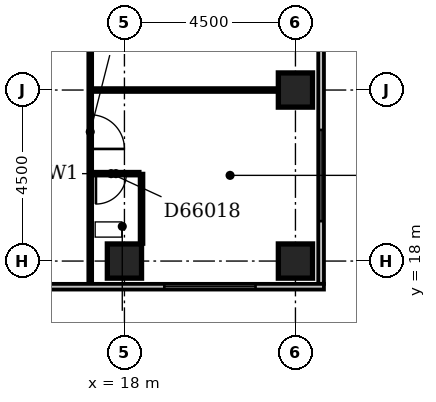
"""IFC4 building model, lengths in metres.
Left out: names, types, materials, properties, quantities, classifications, styles, units other than length and angle.
Written with IfcOpenShell. Run it as: python <this file> out.ifc"""

import sys

from ifc_helpers import new_model, si_unit, direction, frame, frame_2d, origin, origin_2d, place, context, subcontext, project, spatial, rectangle, extrude, element, fill, save


model = new_model("IFC4")
c1 = context("Model", 3, precision=1e-05, world=origin(), true_north=direction((0.0, 1.0)))
c2 = subcontext(c1, "Body", "Model", "MODEL_VIEW")
j1 = project(units=[si_unit("LENGTHUNIT", "METRE"), si_unit("PLANEANGLEUNIT", "RADIAN")], contexts=[c1])
p1 = place(None, origin())
s1 = spatial("IfcSite", under=j1, at=p1, CompositionType="ELEMENT")
p2 = place(p1, origin())
s2 = spatial("IfcBuilding", under=s1, at=p2, CompositionType="ELEMENT")
p3 = place(p2, frame((0.0, 0.0, 254.6)))
s3 = spatial("IfcBuildingStorey", under=s2, at=p3, CompositionType="ELEMENT", Elevation=254.6)
for number, where, z_axis, x_axis in (
    (1, (18.0, 18.0, -0.3), (0.0, 0.0, 1.0), (1.0, 0.0, 0.0)),
    (2, (22.5, 18.0, -0.3), (0.0, 0.0, 1.0), (1.0, 0.0, 0.0)),
    (3, (22.5, 22.5, -0.3), (0.0, 0.0, 1.0), (1.0, 0.0, 0.0)),
):
    element("IfcColumn", number, at=place(p3, frame(where, z_axis=z_axis, x_axis=x_axis)), inside=s3, PredefinedType="COLUMN", context=c2, shape_type="SweptSolid", body=[
        extrude(rectangle(XDim=0.9, YDim=0.9, at=origin_2d()), origin(), (0.0, 0.0, 1.0), 3.45),
    ])
p4 = place(p3, frame((3.9, 17.325, 0.0), z_axis=(0.0, 0.0, 1.0), x_axis=(1.0, 0.0, 0.0)))
e4 = element("IfcWall", 4, at=p4, inside=s3, PredefinedType="STANDARD", context=c2, shape_type="SweptSolid", body=[
    extrude(rectangle(XDim=19.35, YDim=0.15, at=frame_2d((9.675, 0.0))), origin(), (0.0, 0.0, 1.0), 2.7),
])
p5 = place(p4, frame((6.15, 0.0, 0.6)))
e5 = element("IfcOpeningElement", 5, at=p5, cuts=e4, PredefinedType="OPENING", context=c2, shape_type="SweptSolid", body=[
    extrude(rectangle(XDim=2.4, YDim=1.8, at=frame_2d((1.2, 0.9))), frame((0.0, 0.087, 0.0), z_axis=(0.0, -1.0, 0.0), x_axis=(1.0, 0.0, 0.0)), (0.0, 0.0, 1.0), 0.174),
])
p6 = place(p4, frame((15.15, 0.0, 0.6)))
e6 = element("IfcOpeningElement", 6, at=p6, cuts=e4, PredefinedType="OPENING", context=c2, shape_type="SweptSolid", body=[
    extrude(rectangle(XDim=2.4, YDim=1.8, at=frame_2d((1.2, 0.9))), frame((0.0, 0.087, 0.0), z_axis=(0.0, -1.0, 0.0), x_axis=(1.0, 0.0, 0.0)), (0.0, 0.0, 1.0), 0.174),
])
p7 = place(p3, frame((23.175, 17.4, 0.0), z_axis=(0.0, 0.0, 1.0), x_axis=(0.0, 1.0, 0.0)))
e7 = element("IfcWall", 7, at=p7, inside=s3, PredefinedType="STANDARD", context=c2, shape_type="SweptSolid", body=[
    extrude(rectangle(XDim=17.85, YDim=0.15, at=frame_2d((8.925, 0.0))), origin(), (0.0, 0.0, 1.0), 2.7),
])
p8 = place(p7, frame((1.65, 0.0, 0.6)))
e8 = element("IfcOpeningElement", 8, at=p8, cuts=e7, PredefinedType="OPENING", context=c2, shape_type="SweptSolid", body=[
    extrude(rectangle(XDim=2.4, YDim=1.8, at=frame_2d((1.2, 0.9))), frame((0.0, 0.087, 0.0), z_axis=(0.0, -1.0, 0.0), x_axis=(1.0, 0.0, 0.0)), (0.0, 0.0, 1.0), 0.174),
])
p9 = place(p7, frame((6.15, 0.0, 0.6)))
e9 = element("IfcOpeningElement", 9, at=p9, cuts=e7, PredefinedType="OPENING", context=c2, shape_type="SweptSolid", body=[
    extrude(rectangle(XDim=2.4, YDim=1.8, at=frame_2d((1.2, 0.9))), frame((0.0, 0.087, 0.0), z_axis=(0.0, -1.0, 0.0), x_axis=(1.0, 0.0, 0.0)), (0.0, 0.0, 1.0), 0.174),
])
p10 = place(p7, frame((10.65, 0.0, 0.6)))
e10 = element("IfcOpeningElement", 10, at=p10, cuts=e7, PredefinedType="OPENING", context=c2, shape_type="SweptSolid", body=[
    extrude(rectangle(XDim=2.4, YDim=1.8, at=frame_2d((1.2, 0.9))), frame((0.0, 0.087, 0.0), z_axis=(0.0, -1.0, 0.0), x_axis=(1.0, 0.0, 0.0)), (0.0, 0.0, 1.0), 0.174),
])
p11 = place(p7, frame((14.817, 0.0, 0.6)))
e11 = element("IfcOpeningElement", 11, at=p11, cuts=e7, PredefinedType="OPENING", context=c2, shape_type="SweptSolid", body=[
    extrude(rectangle(XDim=0.9, YDim=1.8, at=frame_2d((0.45, 0.9))), frame((0.0, 0.087, 0.0), z_axis=(0.0, -1.0, 0.0), x_axis=(1.0, 0.0, 0.0)), (0.0, 0.0, 1.0), 0.174),
])
p12 = place(p3, frame((17.1, 17.4, 0.0), z_axis=(0.0, 0.0, 1.0), x_axis=(0.0, 1.0, 0.0)))
e12 = element("IfcWall", 12, at=p12, inside=s3, PredefinedType="PARTITIONING", context=c2, shape_type="SweptSolid", body=[
    extrude(rectangle(XDim=18.5, YDim=0.1, at=frame_2d((9.25, 0.0))), origin(), (0.0, 0.0, 1.0), 3.15),
])
p13 = place(p12, frame((3.55, 0.0, 0.0)))
e13 = element("IfcOpeningElement", 13, at=p13, cuts=e12, PredefinedType="OPENING", context=c2, shape_type="SweptSolid", body=[
    extrude(rectangle(XDim=0.9, YDim=2.1, at=frame_2d((0.45, 1.05))), frame((0.0, 0.062, 0.0), z_axis=(0.0, -1.0, 0.0), x_axis=(1.0, 0.0, 0.0)), (0.0, 0.0, 1.0), 0.124),
])
p14 = place(p12, frame((9.1, 0.0, 0.0)))
e14 = element("IfcOpeningElement", 14, at=p14, cuts=e12, PredefinedType="OPENING", context=c2, shape_type="SweptSolid", body=[
    extrude(rectangle(XDim=0.9, YDim=2.1, at=frame_2d((0.45, 1.05))), frame((0.0, 0.062, 0.0), z_axis=(0.0, -1.0, 0.0), x_axis=(1.0, 0.0, 0.0)), (0.0, 0.0, 1.0), 0.124),
])
p15 = place(p12, frame((14.75, 0.0, 0.0)))
e15 = element("IfcOpeningElement", 15, at=p15, cuts=e12, PredefinedType="OPENING", context=c2, shape_type="SweptSolid", body=[
    extrude(rectangle(XDim=0.9, YDim=2.1, at=frame_2d((0.45, 1.05))), frame((0.0, 0.062, 0.0), z_axis=(0.0, -1.0, 0.0), x_axis=(1.0, 0.0, 0.0)), (0.0, 0.0, 1.0), 0.124),
])
p16 = place(p3, frame((18.45, 18.45, 0.0), z_axis=(0.0, 0.0, 1.0), x_axis=(0.0, 1.0, 0.0)))
e16 = element("IfcWall", 16, at=p16, inside=s3, PredefinedType="PLUMBINGWALL", context=c2, shape_type="SweptSolid", body=[
    extrude(rectangle(XDim=1.85, YDim=0.1, at=frame_2d((0.925, 0.0))), origin(), (0.0, 0.0, 1.0), 3.15),
])
p17 = place(p3, frame((17.15, 20.3, 0.0), z_axis=(0.0, 0.0, 1.0), x_axis=(1.0, 0.0, 0.0)))
e17 = element("IfcWall", 17, at=p17, inside=s3, PredefinedType="PLUMBINGWALL", context=c2, shape_type="SweptSolid", body=[
    extrude(rectangle(XDim=1.25, YDim=0.1, at=frame_2d((0.625, 0.0))), origin(), (0.0, 0.0, 1.0), 3.15),
])
p18 = place(p17, frame((0.1, 0.0, 0.0)))
e18 = element("IfcOpeningElement", 18, at=p18, cuts=e17, PredefinedType="OPENING", context=c2, shape_type="SweptSolid", body=[
    extrude(rectangle(XDim=0.8, YDim=2.1, at=frame_2d((0.4, 1.05))), frame((0.0, 0.062, 0.0), z_axis=(0.0, -1.0, 0.0), x_axis=(1.0, 0.0, 0.0)), (0.0, 0.0, 1.0), 0.124),
])
p19 = place(p3, frame((17.15, 22.5, 0.0), z_axis=(0.0, 0.0, 1.0), x_axis=(1.0, 0.0, 0.0)))
e19 = element("IfcWall", 19, at=p19, inside=s3, PredefinedType="PARTITIONING", context=c2, shape_type="SweptSolid", body=[
    extrude(rectangle(XDim=4.9, YDim=0.1, at=frame_2d((2.45, 0.0))), origin(), (0.0, 0.0, 1.0), 3.15),
])
p20 = place(p6, origin())
e20 = element("IfcWindow", 20, at=p20, inside=s3, PartitioningType="SINGLE_PANEL", PredefinedType="WINDOW", context=c2, shape_type="SweptSolid", body=[
    extrude(rectangle(XDim=2.4, YDim=1.8, at=frame_2d((1.2, 0.9))), frame((0.0, 0.03, 0.0), z_axis=(0.0, -1.0, 0.0), x_axis=(1.0, 0.0, 0.0)), (0.0, 0.0, 1.0), 0.06),
])
fill(e6, e20)
p21 = place(p8, origin())
e21 = element("IfcWindow", 21, at=p21, inside=s3, PartitioningType="SINGLE_PANEL", PredefinedType="WINDOW", context=c2, shape_type="SweptSolid", body=[
    extrude(rectangle(XDim=2.4, YDim=1.8, at=frame_2d((1.2, 0.9))), frame((0.0, 0.03, 0.0), z_axis=(0.0, -1.0, 0.0), x_axis=(1.0, 0.0, 0.0)), (0.0, 0.0, 1.0), 0.06),
])
fill(e8, e21)
p22 = place(p13, frame((0.9, 0.0, 0.0), z_axis=(0.0, 0.0, 1.0), x_axis=(-1.0, 0.0, 0.0)))
e22 = element("IfcDoor", 22, at=p22, inside=s3, OperationType="SINGLE_SWING_RIGHT", PredefinedType="DOOR", context=c2, shape_type="SweptSolid", body=[
    extrude(rectangle(XDim=0.9, YDim=2.1, at=frame_2d((0.45, 1.05))), frame((0.0, 0.025, 0.0), z_axis=(0.0, -1.0, 0.0), x_axis=(1.0, 0.0, 0.0)), (0.0, 0.0, 1.0), 0.05),
])
fill(e13, e22)
p23 = place(p18, frame((0.8, 0.0, 0.0), z_axis=(0.0, 0.0, 1.0), x_axis=(-1.0, 0.0, 0.0)))
e23 = element("IfcDoor", 23, at=p23, inside=s3, OperationType="SINGLE_SWING_RIGHT", PredefinedType="DOOR", context=c2, shape_type="SweptSolid", body=[
    extrude(rectangle(XDim=0.8, YDim=2.1, at=frame_2d((0.4, 1.05))), frame((0.0, 0.025, 0.0), z_axis=(0.0, -1.0, 0.0), x_axis=(1.0, 0.0, 0.0)), (0.0, 0.0, 1.0), 0.05),
])
fill(e18, e23)
save(model, sys.argv[1])
